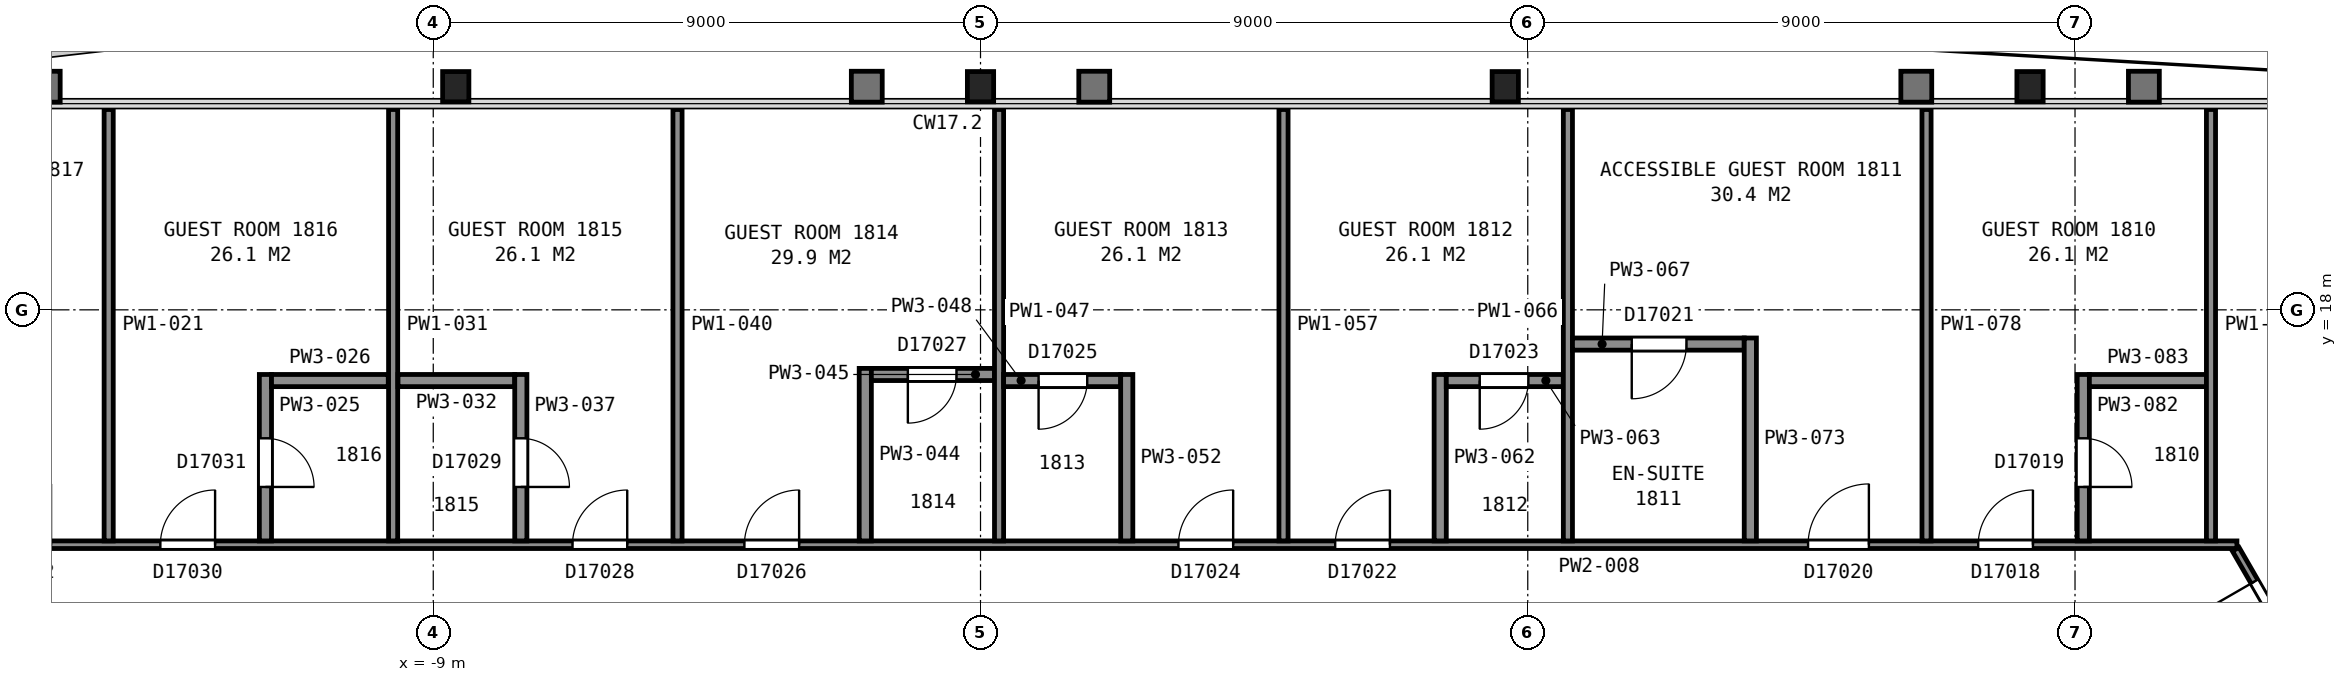
"""IFC4 building model, lengths in metres.
Left out: names, types, materials, properties, quantities, classifications, styles, units other than length and angle.
Written with IfcOpenShell. Run it as: python <this file> out.ifc"""

import sys

from ifc_helpers import new_model, si_unit, direction, frame, frame_2d, origin, origin_2d, place, context, subcontext, project, spatial, rectangle, i_section, extrude, element, fill, save


model = new_model("IFC4")
c1 = context("Model", 3, precision=1e-05, world=origin(), true_north=direction((0.0, 1.0)))
c2 = subcontext(c1, "Body", "Model", "MODEL_VIEW")
j1 = project(units=[si_unit("LENGTHUNIT", "METRE"), si_unit("PLANEANGLEUNIT", "RADIAN")], contexts=[c1])
p1 = place(None, origin())
s1 = spatial("IfcSite", under=j1, at=p1, CompositionType="ELEMENT")
p2 = place(p1, origin())
s2 = spatial("IfcBuilding", under=s1, at=p2, CompositionType="ELEMENT")
p3 = place(p2, frame((0.0, 0.0, 80.0)))
s3 = spatial("IfcBuildingStorey", under=s2, at=p3, CompositionType="ELEMENT", Elevation=80.0)
for number, where, z_axis, x_axis in (
    (1, (17.26, 21.67, 0.0), (0.0, 0.0, 1.0), (1.0, 0.0, 0.0)),
    (2, (8.63, 21.67, 0.0), (0.0, 0.0, 1.0), (1.0, 0.0, 0.0)),
    (3, (0.0, 21.67, 0.0), (0.0, 0.0, 1.0), (1.0, 0.0, 0.0)),
    (4, (-8.63, 21.67, 0.0), (0.0, 0.0, 1.0), (1.0, 0.0, 0.0)),
):
    element("IfcColumn", number, at=place(p3, frame(where, z_axis=z_axis, x_axis=x_axis)), inside=s3, PredefinedType="COLUMN", context=c2, shape_type="SweptSolid", body=[
        extrude(i_section(OverallWidth=0.432, OverallDepth=0.498, WebThickness=0.056, FlangeThickness=0.089, FilletRadius=0.015, at=origin_2d()), origin(), (0.0, 0.0, 1.0), 3.6),
    ])
p4 = place(p3, frame((-20.663, 14.137, 0.0), z_axis=(0.0, 0.0, 1.0), x_axis=(1.0, 0.0, 0.0)))
e5 = element("IfcWall", 5, at=p4, inside=s3, PredefinedType="PARTITIONING", context=c2, shape_type="SweptSolid", body=[
    extrude(rectangle(XDim=41.325, YDim=0.125, at=frame_2d((20.663, 0.0))), origin(), (0.0, 0.0, 1.0), 2.613),
])
p5 = place(p4, frame((37.071, 0.0, 0.0)))
e6 = element("IfcOpeningElement", 6, at=p5, cuts=e5, PredefinedType="OPENING", context=c2, shape_type="SweptSolid", body=[
    extrude(rectangle(XDim=0.9, YDim=2.1, at=frame_2d((0.45, 1.05))), frame((0.0, 0.073, 0.0), z_axis=(0.0, -1.0, 0.0), x_axis=(1.0, 0.0, 0.0)), (0.0, 0.0, 1.0), 0.145),
])
p6 = place(p4, frame((34.272, 0.0, 0.0)))
e7 = element("IfcOpeningElement", 7, at=p6, cuts=e5, PredefinedType="OPENING", context=c2, shape_type="SweptSolid", body=[
    extrude(rectangle(XDim=1.0, YDim=2.1, at=frame_2d((0.5, 1.05))), frame((0.0, 0.073, 0.0), z_axis=(0.0, -1.0, 0.0), x_axis=(1.0, 0.0, 0.0)), (0.0, 0.0, 1.0), 0.145),
])
p7 = place(p4, frame((26.496, 0.0, 0.0)))
e8 = element("IfcOpeningElement", 8, at=p7, cuts=e5, PredefinedType="OPENING", context=c2, shape_type="SweptSolid", body=[
    extrude(rectangle(XDim=0.9, YDim=2.1, at=frame_2d((0.45, 1.05))), frame((0.0, 0.073, 0.0), z_axis=(0.0, -1.0, 0.0), x_axis=(1.0, 0.0, 0.0)), (0.0, 0.0, 1.0), 0.145),
])
p8 = place(p4, frame((23.917, 0.0, 0.0)))
e9 = element("IfcOpeningElement", 9, at=p8, cuts=e5, PredefinedType="OPENING", context=c2, shape_type="SweptSolid", body=[
    extrude(rectangle(XDim=0.9, YDim=2.1, at=frame_2d((0.45, 1.05))), frame((0.0, 0.073, 0.0), z_axis=(0.0, -1.0, 0.0), x_axis=(1.0, 0.0, 0.0)), (0.0, 0.0, 1.0), 0.145),
])
p9 = place(p4, frame((16.78, 0.0, 0.0)))
e10 = element("IfcOpeningElement", 10, at=p9, cuts=e5, PredefinedType="OPENING", context=c2, shape_type="SweptSolid", body=[
    extrude(rectangle(XDim=0.9, YDim=2.1, at=frame_2d((0.45, 1.05))), frame((0.0, 0.073, 0.0), z_axis=(0.0, -1.0, 0.0), x_axis=(1.0, 0.0, 0.0)), (0.0, 0.0, 1.0), 0.145),
])
p10 = place(p4, frame((13.952, 0.0, 0.0)))
e11 = element("IfcOpeningElement", 11, at=p10, cuts=e5, PredefinedType="OPENING", context=c2, shape_type="SweptSolid", body=[
    extrude(rectangle(XDim=0.9, YDim=2.1, at=frame_2d((0.45, 1.05))), frame((0.0, 0.073, 0.0), z_axis=(0.0, -1.0, 0.0), x_axis=(1.0, 0.0, 0.0)), (0.0, 0.0, 1.0), 0.145),
])
p11 = place(p4, frame((7.175, 0.0, 0.0)))
e12 = element("IfcOpeningElement", 12, at=p11, cuts=e5, PredefinedType="OPENING", context=c2, shape_type="SweptSolid", body=[
    extrude(rectangle(XDim=0.9, YDim=2.1, at=frame_2d((0.45, 1.05))), frame((0.0, 0.073, 0.0), z_axis=(0.0, -1.0, 0.0), x_axis=(1.0, 0.0, 0.0)), (0.0, 0.0, 1.0), 0.145),
])
p12 = place(p4, frame((4.376, 0.0, 0.0)))
e13 = element("IfcOpeningElement", 13, at=p12, cuts=e5, PredefinedType="OPENING", context=c2, shape_type="SweptSolid", body=[
    extrude(rectangle(XDim=1.0, YDim=2.1, at=frame_2d((0.5, 1.05))), frame((0.0, 0.073, 0.0), z_axis=(0.0, -1.0, 0.0), x_axis=(1.0, 0.0, 0.0)), (0.0, 0.0, 1.0), 0.145),
])
p13 = place(p3, frame((-14.338, 14.199, 0.0), z_axis=(0.0, 0.0, 1.0), x_axis=(0.0, 1.0, 0.0)))
e14 = element("IfcWall", 14, at=p13, inside=s3, PredefinedType="PARTITIONING", context=c2, shape_type="SweptSolid", body=[
    extrude(rectangle(XDim=7.095, YDim=0.15, at=frame_2d((3.548, 0.0))), origin(), (0.0, 0.0, 1.0), 2.613),
])
p14 = place(p3, frame((-11.76, 16.937, 0.0), z_axis=(0.0, 0.0, 1.0), x_axis=(0.0, -1.0, 0.0)))
e15 = element("IfcWall", 15, at=p14, inside=s3, PredefinedType="PARTITIONING", context=c2, shape_type="SweptSolid", body=[
    extrude(rectangle(XDim=2.738, YDim=0.2, at=frame_2d((1.369, 0.0))), origin(), (0.0, 0.0, 1.0), 2.613),
])
p15 = place(p14, frame((1.05, 0.0, 0.0)))
e16 = element("IfcOpeningElement", 16, at=p15, cuts=e15, PredefinedType="OPENING", context=c2, shape_type="SweptSolid", body=[
    extrude(rectangle(XDim=0.8, YDim=2.1, at=frame_2d((0.4, 1.05))), frame((0.0, 0.11, 0.0), z_axis=(0.0, -1.0, 0.0), x_axis=(1.0, 0.0, 0.0)), (0.0, 0.0, 1.0), 0.22),
])
p16 = place(p3, frame((-11.66, 16.837, 0.0), z_axis=(0.0, 0.0, 1.0), x_axis=(1.0, 0.0, 0.0)))
e17 = element("IfcWall", 17, at=p16, inside=s3, PredefinedType="PARTITIONING", context=c2, shape_type="SweptSolid", body=[
    extrude(rectangle(XDim=1.92, YDim=0.2, at=frame_2d((0.96, 0.0))), origin(), (0.0, 0.0, 1.0), 2.613),
])
p17 = place(p3, frame((-9.66, 14.199, 0.0), z_axis=(0.0, 0.0, 1.0), x_axis=(0.0, 1.0, 0.0)))
e18 = element("IfcWall", 18, at=p17, inside=s3, PredefinedType="PARTITIONING", context=c2, shape_type="SweptSolid", body=[
    extrude(rectangle(XDim=7.095, YDim=0.15, at=frame_2d((3.548, 0.0))), origin(), (0.0, 0.0, 1.0), 2.613),
])
p18 = place(p3, frame((-9.58, 16.837, 0.0), z_axis=(0.0, 0.0, 1.0), x_axis=(1.0, 0.0, 0.0)))
e19 = element("IfcWall", 19, at=p18, inside=s3, PredefinedType="PARTITIONING", context=c2, shape_type="SweptSolid", body=[
    extrude(rectangle(XDim=1.92, YDim=0.2, at=frame_2d((0.96, 0.0))), origin(), (0.0, 0.0, 1.0), 2.613),
])
p19 = place(p3, frame((-7.56, 14.199, 0.0), z_axis=(0.0, 0.0, 1.0), x_axis=(0.0, 1.0, 0.0)))
e20 = element("IfcWall", 20, at=p19, inside=s3, PredefinedType="PARTITIONING", context=c2, shape_type="SweptSolid", body=[
    extrude(rectangle(XDim=2.738, YDim=0.2, at=frame_2d((1.369, 0.0))), origin(), (0.0, 0.0, 1.0), 2.613),
])
p20 = place(p19, frame((0.887, 0.0, 0.0)))
e21 = element("IfcOpeningElement", 21, at=p20, cuts=e20, PredefinedType="OPENING", context=c2, shape_type="SweptSolid", body=[
    extrude(rectangle(XDim=0.8, YDim=2.1, at=frame_2d((0.4, 1.05))), frame((0.0, 0.11, 0.0), z_axis=(0.0, -1.0, 0.0), x_axis=(1.0, 0.0, 0.0)), (0.0, 0.0, 1.0), 0.22),
])
p21 = place(p3, frame((-4.983, 14.199, 0.0), z_axis=(0.0, 0.0, 1.0), x_axis=(0.0, 1.0, 0.0)))
e22 = element("IfcWall", 22, at=p21, inside=s3, PredefinedType="PARTITIONING", context=c2, shape_type="SweptSolid", body=[
    extrude(rectangle(XDim=7.095, YDim=0.15, at=frame_2d((3.548, 0.0))), origin(), (0.0, 0.0, 1.0), 2.613),
])
p22 = place(p3, frame((-1.895, 14.199, 0.0), z_axis=(0.0, 0.0, 1.0), x_axis=(0.0, 1.0, 0.0)))
e23 = element("IfcWall", 23, at=p22, inside=s3, PredefinedType="PARTITIONING", context=c2, shape_type="SweptSolid", body=[
    extrude(rectangle(XDim=2.838, YDim=0.2, at=frame_2d((1.419, 0.0))), origin(), (0.0, 0.0, 1.0), 2.613),
])
p23 = place(p3, frame((0.23, 16.937, 0.0), z_axis=(0.0, 0.0, 1.0), x_axis=(-1.0, 0.0, 0.0)))
e24 = element("IfcWall", 24, at=p23, inside=s3, PredefinedType="PARTITIONING", context=c2, shape_type="SweptSolid", body=[
    extrude(rectangle(XDim=2.025, YDim=0.2, at=frame_2d((1.012, 0.0))), origin(), (0.0, 0.0, 1.0), 2.613),
])
p24 = place(p23, frame((0.625, 0.0, 0.0)))
e25 = element("IfcOpeningElement", 25, at=p24, cuts=e24, PredefinedType="OPENING", context=c2, shape_type="SweptSolid", body=[
    extrude(rectangle(XDim=0.8, YDim=2.1, at=frame_2d((0.4, 1.05))), frame((0.0, 0.11, 0.0), z_axis=(0.0, -1.0, 0.0), x_axis=(1.0, 0.0, 0.0)), (0.0, 0.0, 1.0), 0.22),
])
p25 = place(p3, frame((0.305, 14.199, 0.0), z_axis=(0.0, 0.0, 1.0), x_axis=(0.0, 1.0, 0.0)))
e26 = element("IfcWall", 26, at=p25, inside=s3, PredefinedType="PARTITIONING", context=c2, shape_type="SweptSolid", body=[
    extrude(rectangle(XDim=7.095, YDim=0.15, at=frame_2d((3.548, 0.0))), origin(), (0.0, 0.0, 1.0), 2.613),
])
p26 = place(p3, frame((2.305, 16.837, 0.0), z_axis=(0.0, 0.0, 1.0), x_axis=(-1.0, 0.0, 0.0)))
e27 = element("IfcWall", 27, at=p26, inside=s3, PredefinedType="PARTITIONING", context=c2, shape_type="SweptSolid", body=[
    extrude(rectangle(XDim=1.925, YDim=0.2, at=frame_2d((0.962, 0.0))), origin(), (0.0, 0.0, 1.0), 2.613),
])
p27 = place(p26, frame((0.55, 0.0, 0.0)))
e28 = element("IfcOpeningElement", 28, at=p27, cuts=e27, PredefinedType="OPENING", context=c2, shape_type="SweptSolid", body=[
    extrude(rectangle(XDim=0.8, YDim=2.1, at=frame_2d((0.4, 1.05))), frame((0.0, 0.11, 0.0), z_axis=(0.0, -1.0, 0.0), x_axis=(1.0, 0.0, 0.0)), (0.0, 0.0, 1.0), 0.22),
])
p28 = place(p3, frame((2.405, 14.199, 0.0), z_axis=(0.0, 0.0, 1.0), x_axis=(0.0, 1.0, 0.0)))
e29 = element("IfcWall", 29, at=p28, inside=s3, PredefinedType="PARTITIONING", context=c2, shape_type="SweptSolid", body=[
    extrude(rectangle(XDim=2.738, YDim=0.2, at=frame_2d((1.369, 0.0))), origin(), (0.0, 0.0, 1.0), 2.613),
])
p29 = place(p3, frame((4.983, 14.199, 0.0), z_axis=(0.0, 0.0, 1.0), x_axis=(0.0, 1.0, 0.0)))
e30 = element("IfcWall", 30, at=p29, inside=s3, PredefinedType="PARTITIONING", context=c2, shape_type="SweptSolid", body=[
    extrude(rectangle(XDim=7.095, YDim=0.15, at=frame_2d((3.548, 0.0))), origin(), (0.0, 0.0, 1.0), 2.613),
])
p30 = place(p3, frame((7.56, 14.199, 0.0), z_axis=(0.0, 0.0, 1.0), x_axis=(0.0, 1.0, 0.0)))
e31 = element("IfcWall", 31, at=p30, inside=s3, PredefinedType="PARTITIONING", context=c2, shape_type="SweptSolid", body=[
    extrude(rectangle(XDim=2.738, YDim=0.2, at=frame_2d((1.369, 0.0))), origin(), (0.0, 0.0, 1.0), 2.613),
])
p31 = place(p3, frame((9.585, 16.837, 0.0), z_axis=(0.0, 0.0, 1.0), x_axis=(-1.0, 0.0, 0.0)))
e32 = element("IfcWall", 32, at=p31, inside=s3, PredefinedType="PARTITIONING", context=c2, shape_type="SweptSolid", body=[
    extrude(rectangle(XDim=1.925, YDim=0.2, at=frame_2d((0.962, 0.0))), origin(), (0.0, 0.0, 1.0), 2.613),
])
p32 = place(p31, frame((0.575, 0.0, 0.0)))
e33 = element("IfcOpeningElement", 33, at=p32, cuts=e32, PredefinedType="OPENING", context=c2, shape_type="SweptSolid", body=[
    extrude(rectangle(XDim=0.8, YDim=2.1, at=frame_2d((0.4, 1.05))), frame((0.0, 0.11, 0.0), z_axis=(0.0, -1.0, 0.0), x_axis=(1.0, 0.0, 0.0)), (0.0, 0.0, 1.0), 0.22),
])
p33 = place(p3, frame((9.66, 14.199, 0.0), z_axis=(0.0, 0.0, 1.0), x_axis=(0.0, 1.0, 0.0)))
e34 = element("IfcWall", 34, at=p33, inside=s3, PredefinedType="PARTITIONING", context=c2, shape_type="SweptSolid", body=[
    extrude(rectangle(XDim=7.095, YDim=0.15, at=frame_2d((3.548, 0.0))), origin(), (0.0, 0.0, 1.0), 2.613),
])
p34 = place(p3, frame((12.56, 17.437, 0.0), z_axis=(0.0, 0.0, 1.0), x_axis=(-1.0, 0.0, 0.0)))
e35 = element("IfcWall", 35, at=p34, inside=s3, PredefinedType="PARTITIONING", context=c2, shape_type="SweptSolid", body=[
    extrude(rectangle(XDim=2.825, YDim=0.2, at=frame_2d((1.413, 0.0))), origin(), (0.0, 0.0, 1.0), 2.613),
])
p35 = place(p34, frame((0.95, 0.0, 0.0)))
e36 = element("IfcOpeningElement", 36, at=p35, cuts=e35, PredefinedType="OPENING", context=c2, shape_type="SweptSolid", body=[
    extrude(rectangle(XDim=0.9, YDim=2.1, at=frame_2d((0.45, 1.05))), frame((0.0, 0.11, 0.0), z_axis=(0.0, -1.0, 0.0), x_axis=(1.0, 0.0, 0.0)), (0.0, 0.0, 1.0), 0.22),
])
p36 = place(p3, frame((12.66, 14.199, 0.0), z_axis=(0.0, 0.0, 1.0), x_axis=(0.0, 1.0, 0.0)))
e37 = element("IfcWall", 37, at=p36, inside=s3, PredefinedType="PARTITIONING", context=c2, shape_type="SweptSolid", body=[
    extrude(rectangle(XDim=3.338, YDim=0.2, at=frame_2d((1.669, 0.0))), origin(), (0.0, 0.0, 1.0), 2.613),
])
p37 = place(p3, frame((15.558, 14.199, 0.0), z_axis=(0.0, 0.0, 1.0), x_axis=(0.0, 1.0, 0.0)))
e38 = element("IfcWall", 38, at=p37, inside=s3, PredefinedType="PARTITIONING", context=c2, shape_type="SweptSolid", body=[
    extrude(rectangle(XDim=7.095, YDim=0.15, at=frame_2d((3.548, 0.0))), origin(), (0.0, 0.0, 1.0), 2.613),
])
p38 = place(p3, frame((18.136, 16.937, 0.0), z_axis=(0.0, 0.0, 1.0), x_axis=(0.0, -1.0, 0.0)))
e39 = element("IfcWall", 39, at=p38, inside=s3, PredefinedType="PARTITIONING", context=c2, shape_type="SweptSolid", body=[
    extrude(rectangle(XDim=2.738, YDim=0.2, at=frame_2d((1.369, 0.0))), origin(), (0.0, 0.0, 1.0), 2.613),
])
p39 = place(p38, frame((1.05, 0.0, 0.0)))
e40 = element("IfcOpeningElement", 40, at=p39, cuts=e39, PredefinedType="OPENING", context=c2, shape_type="SweptSolid", body=[
    extrude(rectangle(XDim=0.8, YDim=2.1, at=frame_2d((0.4, 1.05))), frame((0.0, 0.11, 0.0), z_axis=(0.0, -1.0, 0.0), x_axis=(1.0, 0.0, 0.0)), (0.0, 0.0, 1.0), 0.22),
])
p40 = place(p3, frame((18.236, 16.837, 0.0), z_axis=(0.0, 0.0, 1.0), x_axis=(1.0, 0.0, 0.0)))
e41 = element("IfcWall", 41, at=p40, inside=s3, PredefinedType="PARTITIONING", context=c2, shape_type="SweptSolid", body=[
    extrude(rectangle(XDim=1.925, YDim=0.2, at=frame_2d((0.962, 0.0))), origin(), (0.0, 0.0, 1.0), 2.613),
])
p41 = place(p3, frame((20.236, 14.199, 0.0), z_axis=(0.0, 0.0, 1.0), x_axis=(0.0, 1.0, 0.0)))
e42 = element("IfcWall", 42, at=p41, inside=s3, PredefinedType="PARTITIONING", context=c2, shape_type="SweptSolid", body=[
    extrude(rectangle(XDim=7.095, YDim=0.15, at=frame_2d((3.548, 0.0))), origin(), (0.0, 0.0, 1.0), 2.613),
])
p42 = place(p3, frame((20.643, 14.063, 0.0), z_axis=(0.0, 0.0, 1.0), x_axis=(0.499647745683, -0.866228682412, 0.0)))
e43 = element("IfcWall", 43, at=p42, inside=s3, PredefinedType="PARTITIONING", context=c2, shape_type="SweptSolid", body=[
    extrude(rectangle(XDim=2.829, YDim=0.125, at=frame_2d((1.415, 0.0))), origin(), (0.0, 0.0, 1.0), 2.613),
])
p43 = place(p42, frame((0.615, 0.0, 0.0)))
e44 = element("IfcOpeningElement", 44, at=p43, cuts=e43, PredefinedType="OPENING", context=c2, shape_type="SweptSolid", body=[
    extrude(rectangle(XDim=1.5, YDim=2.1, at=frame_2d((0.75, 1.05))), frame((0.0, 0.073, 0.0), z_axis=(0.0, -1.0, 0.0), x_axis=(1.0, 0.0, 0.0)), (0.0, 0.0, 1.0), 0.145),
])
p44 = place(p5, origin())
e45 = element("IfcDoor", 45, at=p44, inside=s3, OperationType="SINGLE_SWING_RIGHT", PredefinedType="DOOR", context=c2, shape_type="SweptSolid", body=[
    extrude(rectangle(XDim=0.9, YDim=2.1, at=frame_2d((0.45, 1.05))), frame((0.0, 0.025, 0.0), z_axis=(0.0, -1.0, 0.0), x_axis=(1.0, 0.0, 0.0)), (0.0, 0.0, 1.0), 0.05),
])
fill(e6, e45)
p45 = place(p6, origin())
e46 = element("IfcDoor", 46, at=p45, inside=s3, OperationType="SINGLE_SWING_RIGHT", PredefinedType="DOOR", context=c2, shape_type="SweptSolid", body=[
    extrude(rectangle(XDim=1.0, YDim=2.1, at=frame_2d((0.5, 1.05))), frame((0.0, 0.025, 0.0), z_axis=(0.0, -1.0, 0.0), x_axis=(1.0, 0.0, 0.0)), (0.0, 0.0, 1.0), 0.05),
])
fill(e7, e46)
p46 = place(p7, origin())
e47 = element("IfcDoor", 47, at=p46, inside=s3, OperationType="SINGLE_SWING_RIGHT", PredefinedType="DOOR", context=c2, shape_type="SweptSolid", body=[
    extrude(rectangle(XDim=0.9, YDim=2.1, at=frame_2d((0.45, 1.05))), frame((0.0, 0.025, 0.0), z_axis=(0.0, -1.0, 0.0), x_axis=(1.0, 0.0, 0.0)), (0.0, 0.0, 1.0), 0.05),
])
fill(e8, e47)
p47 = place(p8, origin())
e48 = element("IfcDoor", 48, at=p47, inside=s3, OperationType="SINGLE_SWING_RIGHT", PredefinedType="DOOR", context=c2, shape_type="SweptSolid", body=[
    extrude(rectangle(XDim=0.9, YDim=2.1, at=frame_2d((0.45, 1.05))), frame((0.0, 0.025, 0.0), z_axis=(0.0, -1.0, 0.0), x_axis=(1.0, 0.0, 0.0)), (0.0, 0.0, 1.0), 0.05),
])
fill(e9, e48)
p48 = place(p9, origin())
e49 = element("IfcDoor", 49, at=p48, inside=s3, OperationType="SINGLE_SWING_RIGHT", PredefinedType="DOOR", context=c2, shape_type="SweptSolid", body=[
    extrude(rectangle(XDim=0.9, YDim=2.1, at=frame_2d((0.45, 1.05))), frame((0.0, 0.025, 0.0), z_axis=(0.0, -1.0, 0.0), x_axis=(1.0, 0.0, 0.0)), (0.0, 0.0, 1.0), 0.05),
])
fill(e10, e49)
p49 = place(p10, origin())
e50 = element("IfcDoor", 50, at=p49, inside=s3, OperationType="SINGLE_SWING_RIGHT", PredefinedType="DOOR", context=c2, shape_type="SweptSolid", body=[
    extrude(rectangle(XDim=0.9, YDim=2.1, at=frame_2d((0.45, 1.05))), frame((0.0, 0.025, 0.0), z_axis=(0.0, -1.0, 0.0), x_axis=(1.0, 0.0, 0.0)), (0.0, 0.0, 1.0), 0.05),
])
fill(e11, e50)
p50 = place(p11, origin())
e51 = element("IfcDoor", 51, at=p50, inside=s3, OperationType="SINGLE_SWING_RIGHT", PredefinedType="DOOR", context=c2, shape_type="SweptSolid", body=[
    extrude(rectangle(XDim=0.9, YDim=2.1, at=frame_2d((0.45, 1.05))), frame((0.0, 0.025, 0.0), z_axis=(0.0, -1.0, 0.0), x_axis=(1.0, 0.0, 0.0)), (0.0, 0.0, 1.0), 0.05),
])
fill(e12, e51)
p51 = place(p15, origin())
e52 = element("IfcDoor", 52, at=p51, inside=s3, OperationType="SINGLE_SWING_RIGHT", PredefinedType="DOOR", context=c2, shape_type="SweptSolid", body=[
    extrude(rectangle(XDim=0.8, YDim=2.1, at=frame_2d((0.4, 1.05))), frame((0.0, 0.025, 0.0), z_axis=(0.0, -1.0, 0.0), x_axis=(1.0, 0.0, 0.0)), (0.0, 0.0, 1.0), 0.05),
])
fill(e16, e52)
p52 = place(p20, origin())
e53 = element("IfcDoor", 53, at=p52, inside=s3, OperationType="SINGLE_SWING_LEFT", PredefinedType="DOOR", context=c2, shape_type="SweptSolid", body=[
    extrude(rectangle(XDim=0.8, YDim=2.1, at=frame_2d((0.4, 1.05))), frame((0.0, 0.025, 0.0), z_axis=(0.0, -1.0, 0.0), x_axis=(1.0, 0.0, 0.0)), (0.0, 0.0, 1.0), 0.05),
])
fill(e21, e53)
p53 = place(p24, origin())
e54 = element("IfcDoor", 54, at=p53, inside=s3, OperationType="SINGLE_SWING_RIGHT", PredefinedType="DOOR", context=c2, shape_type="SweptSolid", body=[
    extrude(rectangle(XDim=0.8, YDim=2.1, at=frame_2d((0.4, 1.05))), frame((0.0, 0.025, 0.0), z_axis=(0.0, -1.0, 0.0), x_axis=(1.0, 0.0, 0.0)), (0.0, 0.0, 1.0), 0.05),
])
fill(e25, e54)
p54 = place(p27, origin())
e55 = element("IfcDoor", 55, at=p54, inside=s3, OperationType="SINGLE_SWING_RIGHT", PredefinedType="DOOR", context=c2, shape_type="SweptSolid", body=[
    extrude(rectangle(XDim=0.8, YDim=2.1, at=frame_2d((0.4, 1.05))), frame((0.0, 0.025, 0.0), z_axis=(0.0, -1.0, 0.0), x_axis=(1.0, 0.0, 0.0)), (0.0, 0.0, 1.0), 0.05),
])
fill(e28, e55)
p55 = place(p32, origin())
e56 = element("IfcDoor", 56, at=p55, inside=s3, OperationType="SINGLE_SWING_RIGHT", PredefinedType="DOOR", context=c2, shape_type="SweptSolid", body=[
    extrude(rectangle(XDim=0.8, YDim=2.1, at=frame_2d((0.4, 1.05))), frame((0.0, 0.025, 0.0), z_axis=(0.0, -1.0, 0.0), x_axis=(1.0, 0.0, 0.0)), (0.0, 0.0, 1.0), 0.05),
])
fill(e33, e56)
p56 = place(p35, origin())
e57 = element("IfcDoor", 57, at=p56, inside=s3, OperationType="SINGLE_SWING_RIGHT", PredefinedType="DOOR", context=c2, shape_type="SweptSolid", body=[
    extrude(rectangle(XDim=0.9, YDim=2.1, at=frame_2d((0.45, 1.05))), frame((0.0, 0.025, 0.0), z_axis=(0.0, -1.0, 0.0), x_axis=(1.0, 0.0, 0.0)), (0.0, 0.0, 1.0), 0.05),
])
fill(e36, e57)
p57 = place(p39, origin())
e58 = element("IfcDoor", 58, at=p57, inside=s3, OperationType="SINGLE_SWING_RIGHT", PredefinedType="DOOR", context=c2, shape_type="SweptSolid", body=[
    extrude(rectangle(XDim=0.8, YDim=2.1, at=frame_2d((0.4, 1.05))), frame((0.0, 0.025, 0.0), z_axis=(0.0, -1.0, 0.0), x_axis=(1.0, 0.0, 0.0)), (0.0, 0.0, 1.0), 0.05),
])
fill(e40, e58)
p58 = place(p43, origin())
e59 = element("IfcDoor", 59, at=p58, inside=s3, OperationType="DOUBLE_DOOR_SINGLE_SWING", PredefinedType="DOOR", context=c2, shape_type="SweptSolid", body=[
    extrude(rectangle(XDim=1.5, YDim=2.1, at=frame_2d((0.75, 1.05))), frame((0.0, 0.025, 0.0), z_axis=(0.0, -1.0, 0.0), x_axis=(1.0, 0.0, 0.0)), (0.0, 0.0, 1.0), 0.05),
])
fill(e44, e59)
save(model, sys.argv[1])
